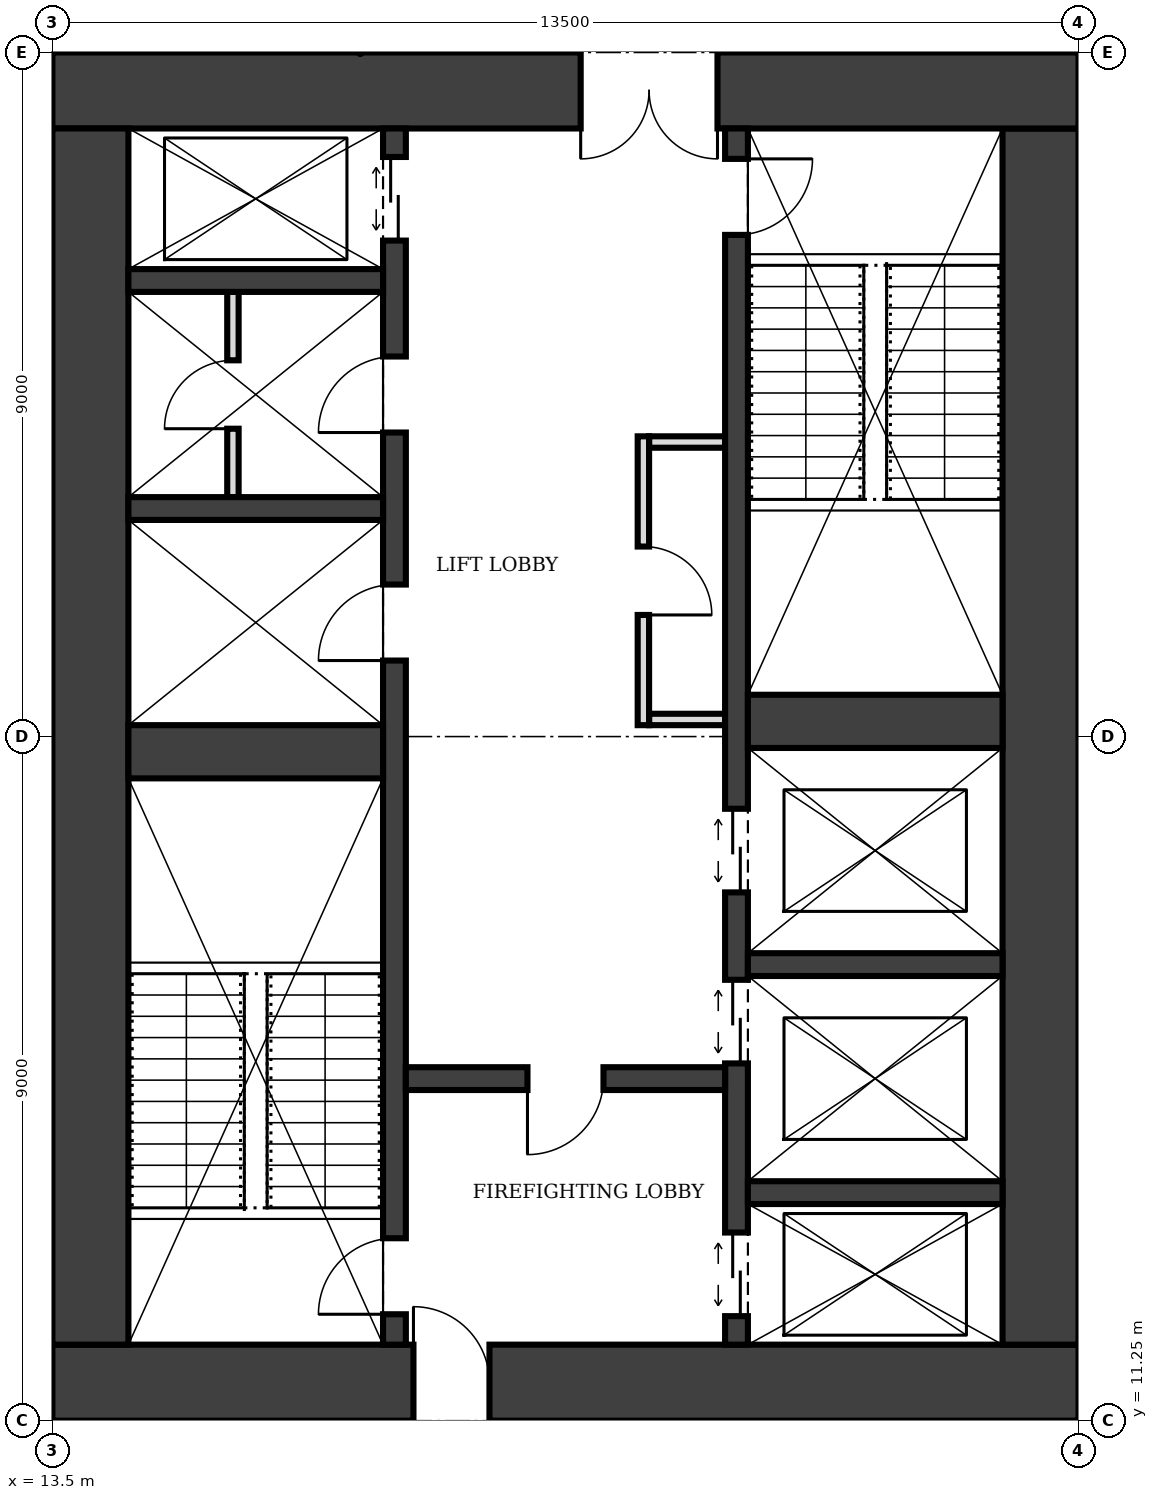
"""IFC4 building model, lengths in metres.
Left out: names, types, materials, properties, quantities, classifications, styles, units other than length and angle.
Written with IfcOpenShell. Run it as: python <this file> out.ifc"""

import sys

from ifc_helpers import new_model, si_unit, direction, frame, frame_2d, origin, place, context, subcontext, project, spatial, rectangle, extrude, element, fill, save


model = new_model("IFC4")
c1 = context("Model", 3, precision=1e-05, world=origin(), true_north=direction((0.0, 1.0)))
c2 = subcontext(c1, "Body", "Model", "MODEL_VIEW")
j1 = project(units=[si_unit("LENGTHUNIT", "METRE"), si_unit("PLANEANGLEUNIT", "RADIAN")], contexts=[c1])
p1 = place(None, origin())
s1 = spatial("IfcSite", under=j1, at=p1, CompositionType="ELEMENT")
p2 = place(p1, origin())
s2 = spatial("IfcBuilding", under=s1, at=p2, CompositionType="ELEMENT")
p3 = place(p2, frame((0.0, 0.0, 221.0)))
s3 = spatial("IfcBuildingStorey", under=s2, at=p3, CompositionType="ELEMENT", Elevation=221.0)
p4 = place(p3, frame((13.5, 11.75, 0.0), z_axis=(0.0, 0.0, 1.0), x_axis=(1.0, 0.0, 0.0)))
e1 = element("IfcWall", 1, at=p4, inside=s3, PredefinedType="SHEAR", context=c2, shape_type="SweptSolid", body=[
    extrude(rectangle(XDim=13.5, YDim=1.0, at=frame_2d((6.75, 0.0))), origin(), (0.0, 0.0, 1.0), 4.0),
])
p5 = place(p4, frame((4.75, 0.0, 0.0)))
e2 = element("IfcOpeningElement", 2, at=p5, cuts=e1, PredefinedType="OPENING", context=c2, shape_type="SweptSolid", body=[
    extrude(rectangle(XDim=1.0, YDim=2.1, at=frame_2d((0.5, 1.05))), frame((0.0, 0.51, 0.0), z_axis=(0.0, -1.0, 0.0), x_axis=(1.0, 0.0, 0.0)), (0.0, 0.0, 1.0), 1.02),
])
p6 = place(p3, frame((26.5, 12.25, 0.0), z_axis=(0.0, 0.0, 1.0), x_axis=(0.0, 1.0, 0.0)))
e3 = element("IfcWall", 3, at=p6, inside=s3, PredefinedType="SHEAR", context=c2, shape_type="SweptSolid", body=[
    extrude(rectangle(XDim=16.0, YDim=1.0, at=frame_2d((8.0, 0.0))), origin(), (0.0, 0.0, 1.0), 4.0),
])
p7 = place(p3, frame((27.0, 28.75, 0.0), z_axis=(0.0, 0.0, 1.0), x_axis=(-1.0, 0.0, 0.0)))
e4 = element("IfcWall", 4, at=p7, inside=s3, PredefinedType="SHEAR", context=c2, shape_type="SweptSolid", body=[
    extrude(rectangle(XDim=13.5, YDim=1.0, at=frame_2d((6.75, 0.0))), origin(), (0.0, 0.0, 1.0), 4.0),
])
p8 = place(p7, frame((4.75, 0.0, 0.0)))
e5 = element("IfcOpeningElement", 5, at=p8, cuts=e4, PredefinedType="OPENING", context=c2, shape_type="SweptSolid", body=[
    extrude(rectangle(XDim=1.8, YDim=2.1, at=frame_2d((0.9, 1.05))), frame((0.0, 0.51, 0.0), z_axis=(0.0, -1.0, 0.0), x_axis=(1.0, 0.0, 0.0)), (0.0, 0.0, 1.0), 1.02),
])
p9 = place(p3, frame((14.0, 28.25, 0.0), z_axis=(0.0, 0.0, 1.0), x_axis=(0.0, -1.0, 0.0)))
e6 = element("IfcWall", 6, at=p9, inside=s3, PredefinedType="SHEAR", context=c2, shape_type="SweptSolid", body=[
    extrude(rectangle(XDim=16.0, YDim=1.0, at=frame_2d((8.0, 0.0))), origin(), (0.0, 0.0, 1.0), 4.0),
])
p10 = place(p3, frame((18.0, 12.25, 0.0), z_axis=(0.0, 0.0, 1.0), x_axis=(0.0, 1.0, 0.0)))
e7 = element("IfcWall", 7, at=p10, inside=s3, PredefinedType="SHEAR", context=c2, shape_type="SweptSolid", body=[
    extrude(rectangle(XDim=16.0, YDim=0.3, at=frame_2d((8.0, 0.0))), origin(), (0.0, 0.0, 1.0), 4.0),
])
p11 = place(p10, frame((0.4, 0.0, 0.0)))
e8 = element("IfcOpeningElement", 8, at=p11, cuts=e7, PredefinedType="OPENING", context=c2, shape_type="SweptSolid", body=[
    extrude(rectangle(XDim=1.0, YDim=2.1, at=frame_2d((0.5, 1.05))), frame((0.0, 0.16, 0.0), z_axis=(0.0, -1.0, 0.0), x_axis=(1.0, 0.0, 0.0)), (0.0, 0.0, 1.0), 0.32),
])
p12 = place(p10, frame((14.525, 0.0, 0.0)))
e9 = element("IfcOpeningElement", 9, at=p12, cuts=e7, PredefinedType="OPENING", context=c2, shape_type="SweptSolid", body=[
    extrude(rectangle(XDim=1.1, YDim=2.1, at=frame_2d((0.55, 1.05))), frame((0.0, 0.16, 0.0), z_axis=(0.0, -1.0, 0.0), x_axis=(1.0, 0.0, 0.0)), (0.0, 0.0, 1.0), 0.32),
])
p13 = place(p10, frame((9.0, 0.0, 0.0)))
e10 = element("IfcOpeningElement", 10, at=p13, cuts=e7, PredefinedType="OPENING", context=c2, shape_type="SweptSolid", body=[
    extrude(rectangle(XDim=1.0, YDim=2.1, at=frame_2d((0.5, 1.05))), frame((0.0, 0.16, 0.0), z_axis=(0.0, -1.0, 0.0), x_axis=(1.0, 0.0, 0.0)), (0.0, 0.0, 1.0), 0.32),
])
p14 = place(p10, frame((12.0, 0.0, 0.0)))
e11 = element("IfcOpeningElement", 11, at=p14, cuts=e7, PredefinedType="OPENING", context=c2, shape_type="SweptSolid", body=[
    extrude(rectangle(XDim=1.0, YDim=2.1, at=frame_2d((0.5, 1.05))), frame((0.0, 0.16, 0.0), z_axis=(0.0, -1.0, 0.0), x_axis=(1.0, 0.0, 0.0)), (0.0, 0.0, 1.0), 0.32),
])
p15 = place(p3, frame((22.5, 12.25, 0.0), z_axis=(0.0, 0.0, 1.0), x_axis=(0.0, 1.0, 0.0)))
e12 = element("IfcWall", 12, at=p15, inside=s3, PredefinedType="SHEAR", context=c2, shape_type="SweptSolid", body=[
    extrude(rectangle(XDim=16.0, YDim=0.3, at=frame_2d((8.0, 0.0))), origin(), (0.0, 0.0, 1.0), 4.0),
])
p16 = place(p15, frame((14.6, 0.0, 0.0)))
e13 = element("IfcOpeningElement", 13, at=p16, cuts=e12, PredefinedType="OPENING", context=c2, shape_type="SweptSolid", body=[
    extrude(rectangle(XDim=1.0, YDim=2.1, at=frame_2d((0.5, 1.05))), frame((0.0, 0.16, 0.0), z_axis=(0.0, -1.0, 0.0), x_axis=(1.0, 0.0, 0.0)), (0.0, 0.0, 1.0), 0.32),
])
p17 = place(p15, frame((0.375, 0.0, 0.0)))
e14 = element("IfcOpeningElement", 14, at=p17, cuts=e12, PredefinedType="OPENING", context=c2, shape_type="SweptSolid", body=[
    extrude(rectangle(XDim=1.1, YDim=2.1, at=frame_2d((0.55, 1.05))), frame((0.0, 0.16, 0.0), z_axis=(0.0, -1.0, 0.0), x_axis=(1.0, 0.0, 0.0)), (0.0, 0.0, 1.0), 0.32),
])
p18 = place(p15, frame((3.7, 0.0, 0.0)))
e15 = element("IfcOpeningElement", 15, at=p18, cuts=e12, PredefinedType="OPENING", context=c2, shape_type="SweptSolid", body=[
    extrude(rectangle(XDim=1.1, YDim=2.1, at=frame_2d((0.55, 1.05))), frame((0.0, 0.16, 0.0), z_axis=(0.0, -1.0, 0.0), x_axis=(1.0, 0.0, 0.0)), (0.0, 0.0, 1.0), 0.32),
])
p19 = place(p15, frame((5.95, 0.0, 0.0)))
e16 = element("IfcOpeningElement", 16, at=p19, cuts=e12, PredefinedType="OPENING", context=c2, shape_type="SweptSolid", body=[
    extrude(rectangle(XDim=1.1, YDim=2.1, at=frame_2d((0.55, 1.05))), frame((0.0, 0.16, 0.0), z_axis=(0.0, -1.0, 0.0), x_axis=(1.0, 0.0, 0.0)), (0.0, 0.0, 1.0), 0.32),
])
p20 = place(p3, frame((14.5, 20.05, 0.0), z_axis=(0.0, 0.0, 1.0), x_axis=(1.0, 0.0, 0.0)))
e17 = element("IfcWall", 17, at=p20, inside=s3, PredefinedType="SHEAR", context=c2, shape_type="SweptSolid", body=[
    extrude(rectangle(XDim=3.35, YDim=0.7, at=frame_2d((1.675, 0.0))), origin(), (0.0, 0.0, 1.0), 4.0),
])
p21 = place(p3, frame((18.15, 15.75, 0.0), z_axis=(0.0, 0.0, 1.0), x_axis=(1.0, 0.0, 0.0)))
e18 = element("IfcWall", 18, at=p21, inside=s3, PredefinedType="SHEAR", context=c2, shape_type="SweptSolid", body=[
    extrude(rectangle(XDim=4.2, YDim=0.3, at=frame_2d((2.1, 0.0))), origin(), (0.0, 0.0, 1.0), 4.0),
])
p22 = place(p21, frame((1.6, 0.0, 0.0)))
e19 = element("IfcOpeningElement", 19, at=p22, cuts=e18, PredefinedType="OPENING", context=c2, shape_type="SweptSolid", body=[
    extrude(rectangle(XDim=1.0, YDim=2.1, at=frame_2d((0.5, 1.05))), frame((0.0, 0.16, 0.0), z_axis=(0.0, -1.0, 0.0), x_axis=(1.0, 0.0, 0.0)), (0.0, 0.0, 1.0), 0.32),
])
for number, where, z_axis, x_axis in (
    (20, (22.65, 14.25, 0.0), (0.0, 0.0, 1.0), (1.0, 0.0, 0.0)),
    (21, (22.65, 17.25, 0.0), (0.0, 0.0, 1.0), (1.0, 0.0, 0.0)),
):
    element("IfcWall", number, at=place(p3, frame(where, z_axis=z_axis, x_axis=x_axis)), inside=s3, PredefinedType="SHEAR", context=c2, shape_type="SweptSolid", body=[
        extrude(rectangle(XDim=3.35, YDim=0.3, at=frame_2d((1.675, 0.0))), origin(), (0.0, 0.0, 1.0), 4.0),
    ])
p23 = place(p3, frame((22.65, 20.45, 0.0), z_axis=(0.0, 0.0, 1.0), x_axis=(1.0, 0.0, 0.0)))
e22 = element("IfcWall", 22, at=p23, inside=s3, PredefinedType="SHEAR", context=c2, shape_type="SweptSolid", body=[
    extrude(rectangle(XDim=3.35, YDim=0.7, at=frame_2d((1.675, 0.0))), origin(), (0.0, 0.0, 1.0), 4.0),
])
for number, where, z_axis, x_axis in (
    (23, (14.5, 23.25, 0.0), (0.0, 0.0, 1.0), (1.0, 0.0, 0.0)),
    (24, (14.5, 26.25, 0.0), (0.0, 0.0, 1.0), (1.0, 0.0, 0.0)),
):
    element("IfcWall", number, at=place(p3, frame(where, z_axis=z_axis, x_axis=x_axis)), inside=s3, PredefinedType="SHEAR", context=c2, shape_type="SweptSolid", body=[
        extrude(rectangle(XDim=3.35, YDim=0.3, at=frame_2d((1.675, 0.0))), origin(), (0.0, 0.0, 1.0), 4.0),
    ])
p24 = place(p3, frame((21.275, 20.4, 0.0), z_axis=(0.0, 0.0, 1.0), x_axis=(0.0, 1.0, 0.0)))
e25 = element("IfcWall", 25, at=p24, inside=s3, PredefinedType="PARTITIONING", context=c2, shape_type="SweptSolid", body=[
    extrude(rectangle(XDim=3.8, YDim=0.15, at=frame_2d((1.9, 0.0))), origin(), (0.0, 0.0, 1.0), 3.75),
])
p25 = place(p24, frame((1.45, 0.0, 0.0)))
e26 = element("IfcOpeningElement", 26, at=p25, cuts=e25, PredefinedType="OPENING", context=c2, shape_type="SweptSolid", body=[
    extrude(rectangle(XDim=0.9, YDim=2.1, at=frame_2d((0.45, 1.05))), frame((0.0, 0.085, 0.0), z_axis=(0.0, -1.0, 0.0), x_axis=(1.0, 0.0, 0.0)), (0.0, 0.0, 1.0), 0.17),
])
for number, where, z_axis, x_axis in (
    (27, (21.35, 20.475, 0.0), (0.0, 0.0, 1.0), (1.0, 0.0, 0.0)),
    (28, (21.35, 24.125, 0.0), (0.0, 0.0, 1.0), (1.0, 0.0, 0.0)),
):
    element("IfcWall", number, at=place(p3, frame(where, z_axis=z_axis, x_axis=x_axis)), inside=s3, PredefinedType="PARTITIONING", context=c2, shape_type="SweptSolid", body=[
        extrude(rectangle(XDim=1.0, YDim=0.15, at=frame_2d((0.5, 0.0))), origin(), (0.0, 0.0, 1.0), 3.75),
    ])
p26 = place(p3, frame((15.875, 23.4, 0.0), z_axis=(0.0, 0.0, 1.0), x_axis=(0.0, 1.0, 0.0)))
e29 = element("IfcWall", 29, at=p26, inside=s3, PredefinedType="PARTITIONING", context=c2, shape_type="SweptSolid", body=[
    extrude(rectangle(XDim=2.7, YDim=0.15, at=frame_2d((1.35, 0.0))), origin(), (0.0, 0.0, 1.0), 3.75),
])
p27 = place(p26, frame((0.9, 0.0, 0.0)))
e30 = element("IfcOpeningElement", 30, at=p27, cuts=e29, PredefinedType="OPENING", context=c2, shape_type="SweptSolid", body=[
    extrude(rectangle(XDim=0.9, YDim=2.1, at=frame_2d((0.45, 1.05))), frame((0.0, 0.085, 0.0), z_axis=(0.0, -1.0, 0.0), x_axis=(1.0, 0.0, 0.0)), (0.0, 0.0, 1.0), 0.17),
])
p28 = place(p5, origin())
e31 = element("IfcDoor", 31, at=p28, inside=s3, OperationType="SINGLE_SWING_LEFT", PredefinedType="DOOR", context=c2, shape_type="SweptSolid", body=[
    extrude(rectangle(XDim=1.0, YDim=2.1, at=frame_2d((0.5, 1.05))), frame((0.0, 0.025, 0.0), z_axis=(0.0, -1.0, 0.0), x_axis=(1.0, 0.0, 0.0)), (0.0, 0.0, 1.0), 0.05),
])
fill(e2, e31)
p29 = place(p8, origin())
e32 = element("IfcDoor", 32, at=p29, inside=s3, OperationType="DOUBLE_DOOR_SINGLE_SWING", PredefinedType="DOOR", context=c2, shape_type="SweptSolid", body=[
    extrude(rectangle(XDim=1.8, YDim=2.1, at=frame_2d((0.9, 1.05))), frame((0.0, 0.025, 0.0), z_axis=(0.0, -1.0, 0.0), x_axis=(1.0, 0.0, 0.0)), (0.0, 0.0, 1.0), 0.05),
])
fill(e5, e32)
p30 = place(p22, frame((1.0, 0.0, 0.0), z_axis=(0.0, 0.0, 1.0), x_axis=(-1.0, 0.0, 0.0)))
e33 = element("IfcDoor", 33, at=p30, inside=s3, OperationType="SINGLE_SWING_RIGHT", PredefinedType="DOOR", context=c2, shape_type="SweptSolid", body=[
    extrude(rectangle(XDim=1.0, YDim=2.1, at=frame_2d((0.5, 1.05))), frame((0.0, 0.025, 0.0), z_axis=(0.0, -1.0, 0.0), x_axis=(1.0, 0.0, 0.0)), (0.0, 0.0, 1.0), 0.05),
])
fill(e19, e33)
p31 = place(p11, origin())
e34 = element("IfcDoor", 34, at=p31, inside=s3, OperationType="SINGLE_SWING_LEFT", PredefinedType="DOOR", context=c2, shape_type="SweptSolid", body=[
    extrude(rectangle(XDim=1.0, YDim=2.1, at=frame_2d((0.5, 1.05))), frame((0.0, 0.025, 0.0), z_axis=(0.0, -1.0, 0.0), x_axis=(1.0, 0.0, 0.0)), (0.0, 0.0, 1.0), 0.05),
])
fill(e8, e34)
p32 = place(p16, frame((1.0, 0.0, 0.0), z_axis=(0.0, 0.0, 1.0), x_axis=(-1.0, 0.0, 0.0)))
e35 = element("IfcDoor", 35, at=p32, inside=s3, OperationType="SINGLE_SWING_LEFT", PredefinedType="DOOR", context=c2, shape_type="SweptSolid", body=[
    extrude(rectangle(XDim=1.0, YDim=2.1, at=frame_2d((0.5, 1.05))), frame((0.0, 0.025, 0.0), z_axis=(0.0, -1.0, 0.0), x_axis=(1.0, 0.0, 0.0)), (0.0, 0.0, 1.0), 0.05),
])
fill(e13, e35)
p33 = place(p17, origin())
e36 = element("IfcDoor", 36, at=p33, inside=s3, OperationType="DOUBLE_DOOR_SLIDING", PredefinedType="DOOR", context=c2, shape_type="SweptSolid", body=[
    extrude(rectangle(XDim=1.1, YDim=2.1, at=frame_2d((0.55, 1.05))), frame((0.0, 0.025, 0.0), z_axis=(0.0, -1.0, 0.0), x_axis=(1.0, 0.0, 0.0)), (0.0, 0.0, 1.0), 0.05),
])
fill(e14, e36)
p34 = place(p12, origin())
e37 = element("IfcDoor", 37, at=p34, inside=s3, OperationType="DOUBLE_DOOR_SLIDING", PredefinedType="DOOR", context=c2, shape_type="SweptSolid", body=[
    extrude(rectangle(XDim=1.1, YDim=2.1, at=frame_2d((0.55, 1.05))), frame((0.0, 0.025, 0.0), z_axis=(0.0, -1.0, 0.0), x_axis=(1.0, 0.0, 0.0)), (0.0, 0.0, 1.0), 0.05),
])
fill(e9, e37)
p35 = place(p18, origin())
e38 = element("IfcDoor", 38, at=p35, inside=s3, OperationType="DOUBLE_DOOR_SLIDING", PredefinedType="DOOR", context=c2, shape_type="SweptSolid", body=[
    extrude(rectangle(XDim=1.1, YDim=2.1, at=frame_2d((0.55, 1.05))), frame((0.0, 0.025, 0.0), z_axis=(0.0, -1.0, 0.0), x_axis=(1.0, 0.0, 0.0)), (0.0, 0.0, 1.0), 0.05),
])
fill(e15, e38)
p36 = place(p19, origin())
e39 = element("IfcDoor", 39, at=p36, inside=s3, OperationType="DOUBLE_DOOR_SLIDING", PredefinedType="DOOR", context=c2, shape_type="SweptSolid", body=[
    extrude(rectangle(XDim=1.1, YDim=2.1, at=frame_2d((0.55, 1.05))), frame((0.0, 0.025, 0.0), z_axis=(0.0, -1.0, 0.0), x_axis=(1.0, 0.0, 0.0)), (0.0, 0.0, 1.0), 0.05),
])
fill(e16, e39)
p37 = place(p25, frame((0.9, 0.0, 0.0), z_axis=(0.0, 0.0, 1.0), x_axis=(-1.0, 0.0, 0.0)))
e40 = element("IfcDoor", 40, at=p37, inside=s3, OperationType="SINGLE_SWING_RIGHT", PredefinedType="DOOR", context=c2, shape_type="SweptSolid", body=[
    extrude(rectangle(XDim=0.9, YDim=2.1, at=frame_2d((0.45, 1.05))), frame((0.0, 0.025, 0.0), z_axis=(0.0, -1.0, 0.0), x_axis=(1.0, 0.0, 0.0)), (0.0, 0.0, 1.0), 0.05),
])
fill(e26, e40)
p38 = place(p13, origin())
e41 = element("IfcDoor", 41, at=p38, inside=s3, OperationType="SINGLE_SWING_LEFT", PredefinedType="DOOR", context=c2, shape_type="SweptSolid", body=[
    extrude(rectangle(XDim=1.0, YDim=2.1, at=frame_2d((0.5, 1.05))), frame((0.0, 0.025, 0.0), z_axis=(0.0, -1.0, 0.0), x_axis=(1.0, 0.0, 0.0)), (0.0, 0.0, 1.0), 0.05),
])
fill(e10, e41)
p39 = place(p14, origin())
e42 = element("IfcDoor", 42, at=p39, inside=s3, OperationType="SINGLE_SWING_LEFT", PredefinedType="DOOR", context=c2, shape_type="SweptSolid", body=[
    extrude(rectangle(XDim=1.0, YDim=2.1, at=frame_2d((0.5, 1.05))), frame((0.0, 0.025, 0.0), z_axis=(0.0, -1.0, 0.0), x_axis=(1.0, 0.0, 0.0)), (0.0, 0.0, 1.0), 0.05),
])
fill(e11, e42)
p40 = place(p27, origin())
e43 = element("IfcDoor", 43, at=p40, inside=s3, OperationType="SINGLE_SWING_LEFT", PredefinedType="DOOR", context=c2, shape_type="SweptSolid", body=[
    extrude(rectangle(XDim=0.9, YDim=2.1, at=frame_2d((0.45, 1.05))), frame((0.0, 0.025, 0.0), z_axis=(0.0, -1.0, 0.0), x_axis=(1.0, 0.0, 0.0)), (0.0, 0.0, 1.0), 0.05),
])
fill(e30, e43)
save(model, sys.argv[1])
